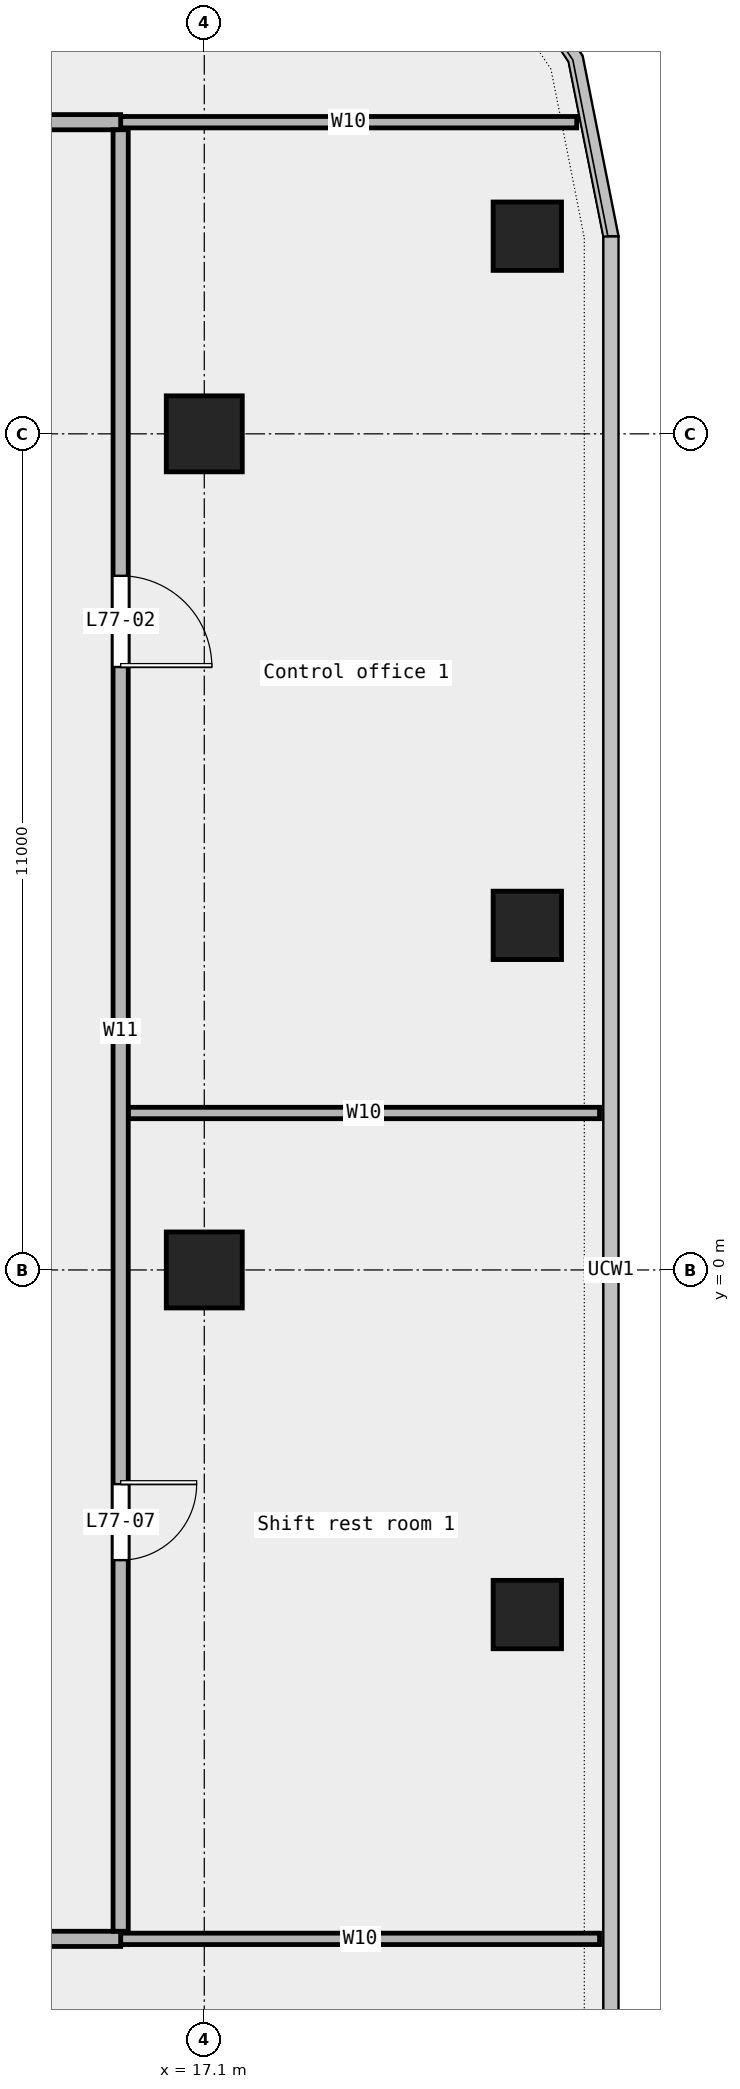
"""IFC4 building model, lengths in metres.
Left out: names, types, materials, properties, quantities, classifications, styles, units other than length and angle.
Written with IfcOpenShell. Run it as: python <this file> out.ifc"""

import sys

from ifc_helpers import new_model, si_unit, direction, frame, frame_2d, origin, origin_2d, place, context, subcontext, project, spatial, rectangle, extrude, element, fill, save


model = new_model("IFC4")
c1 = context("Model", 3, precision=1e-05, world=origin(), true_north=direction((0.0, 1.0)))
c2 = subcontext(c1, "Body", "Model", "MODEL_VIEW")
j1 = project(units=[si_unit("LENGTHUNIT", "METRE"), si_unit("PLANEANGLEUNIT", "RADIAN")], contexts=[c1])
p1 = place(None, origin())
s1 = spatial("IfcSite", under=j1, at=p1, CompositionType="ELEMENT")
p2 = place(p1, origin())
s2 = spatial("IfcBuilding", under=s1, at=p2, CompositionType="ELEMENT")
p3 = place(p2, frame((0.0, 0.0, 353.4)))
s3 = spatial("IfcBuildingStorey", under=s2, at=p3, CompositionType="ELEMENT", Elevation=353.4)
for number, where, z_axis, x_axis in (
    (1, (21.35, -4.533, 0.0), (0.0, 0.0, 1.0), (1.0, 0.0, 0.0)),
    (2, (21.35, 4.533, 0.0), (0.0, 0.0, 1.0), (1.0, 0.0, 0.0)),
    (3, (21.35, 13.6, 0.0), (0.0, 0.0, 1.0), (1.0, 0.0, 0.0)),
):
    element("IfcColumn", number, at=place(p3, frame(where, z_axis=z_axis, x_axis=x_axis)), inside=s3, PredefinedType="COLUMN", context=c2, shape_type="SweptSolid", body=[
        extrude(rectangle(XDim=0.9, YDim=0.9, at=origin_2d()), origin(), (0.0, 0.0, 1.0), 3.6),
    ])
for number, where, z_axis, x_axis in (
    (4, (17.1, 0.0, 0.0), (0.0, 0.0, 1.0), (1.0, 0.0, 0.0)),
    (5, (17.1, 11.0, 0.0), (0.0, 0.0, 1.0), (1.0, 0.0, 0.0)),
):
    element("IfcColumn", number, at=place(p3, frame(where, z_axis=z_axis, x_axis=x_axis)), inside=s3, PredefinedType="COLUMN", context=c2, shape_type="SweptSolid", body=[
        extrude(rectangle(XDim=1.0, YDim=1.0, at=origin_2d()), origin(), (0.0, 0.0, 1.0), 3.6),
    ])
p4 = place(p3, frame((16.0, -8.8, 0.0), z_axis=(0.0, 0.0, 1.0), x_axis=(1.0, 0.0, 0.0)))
e6 = element("IfcWall", 6, at=p4, inside=s3, PredefinedType="PARTITIONING", context=c2, shape_type="SweptSolid", body=[
    extrude(rectangle(XDim=6.3, YDim=0.15, at=frame_2d((3.15, 0.0))), origin(), (0.0, 0.0, 1.0), 3.6),
])
p5 = place(p3, frame((-16.0, -8.8, 0.0), z_axis=(0.0, 0.0, 1.0), x_axis=(1.0, 0.0, 0.0)))
e7 = element("IfcWall", 7, at=p5, inside=s3, PredefinedType="PARTITIONING", context=c2, shape_type="SweptSolid", body=[
    extrude(rectangle(XDim=32.0, YDim=0.2, at=frame_2d((16.0, 0.0))), origin(), (0.0, 0.0, 1.0), 3.6),
])
p6 = place(p5, frame((25.31, 0.0, 0.0)))
e8 = element("IfcOpeningElement", 8, at=p6, cuts=e7, PredefinedType="OPENING", context=c2, shape_type="SweptSolid", body=[
    extrude(rectangle(XDim=1.8, YDim=2.1, at=frame_2d((0.9, 1.05))), frame((0.0, 0.112, 0.0), z_axis=(0.0, -1.0, 0.0), x_axis=(1.0, 0.0, 0.0)), (0.0, 0.0, 1.0), 0.224),
])
p7 = place(p5, frame((7.81, 0.0, 0.0)))
e9 = element("IfcOpeningElement", 9, at=p7, cuts=e7, PredefinedType="OPENING", context=c2, shape_type="SweptSolid", body=[
    extrude(rectangle(XDim=1.8, YDim=2.1, at=frame_2d((0.9, 1.05))), frame((0.0, 0.112, 0.0), z_axis=(0.0, -1.0, 0.0), x_axis=(1.0, 0.0, 0.0)), (0.0, 0.0, 1.0), 0.224),
])
p8 = place(p3, frame((16.1, 2.065, 0.0), z_axis=(0.0, 0.0, 1.0), x_axis=(1.0, 0.0, 0.0)))
e10 = element("IfcWall", 10, at=p8, inside=s3, PredefinedType="PARTITIONING", context=c2, shape_type="SweptSolid", body=[
    extrude(rectangle(XDim=6.2, YDim=0.15, at=frame_2d((3.1, 0.0))), origin(), (0.0, 0.0, 1.0), 3.6),
])
p9 = place(p3, frame((16.0, 15.1, 0.0), z_axis=(0.0, 0.0, 1.0), x_axis=(1.0, 0.0, 0.0)))
e11 = element("IfcWall", 11, at=p9, inside=s3, PredefinedType="PARTITIONING", context=c2, shape_type="SweptSolid", body=[
    extrude(rectangle(XDim=6.0, YDim=0.15, at=frame_2d((3.0, 0.0))), origin(), (0.0, 0.0, 1.0), 3.6),
])
p10 = place(p3, frame((-16.0, 15.1, 0.0), z_axis=(0.0, 0.0, 1.0), x_axis=(1.0, 0.0, 0.0)))
e12 = element("IfcWall", 12, at=p10, inside=s3, PredefinedType="PARTITIONING", context=c2, shape_type="SweptSolid", body=[
    extrude(rectangle(XDim=32.0, YDim=0.2, at=frame_2d((16.0, 0.0))), origin(), (0.0, 0.0, 1.0), 3.6),
])
p11 = place(p10, frame((5.823, 0.0, 0.0)))
e13 = element("IfcOpeningElement", 13, at=p11, cuts=e12, PredefinedType="OPENING", context=c2, shape_type="SweptSolid", body=[
    extrude(rectangle(XDim=1.2, YDim=2.1, at=frame_2d((0.6, 1.05))), frame((0.0, 0.112, 0.0), z_axis=(0.0, -1.0, 0.0), x_axis=(1.0, 0.0, 0.0)), (0.0, 0.0, 1.0), 0.224),
])
p12 = place(p10, frame((18.558, 0.0, 0.0)))
e14 = element("IfcOpeningElement", 14, at=p12, cuts=e12, PredefinedType="OPENING", context=c2, shape_type="SweptSolid", body=[
    extrude(rectangle(XDim=1.2, YDim=2.1, at=frame_2d((0.6, 1.05))), frame((0.0, 0.112, 0.0), z_axis=(0.0, -1.0, 0.0), x_axis=(1.0, 0.0, 0.0)), (0.0, 0.0, 1.0), 0.224),
])
p13 = place(p10, frame((28.135, 0.0, 0.0)))
e15 = element("IfcOpeningElement", 15, at=p13, cuts=e12, PredefinedType="OPENING", context=c2, shape_type="SweptSolid", body=[
    extrude(rectangle(XDim=1.2, YDim=2.1, at=frame_2d((0.6, 1.05))), frame((0.0, 0.112, 0.0), z_axis=(0.0, -1.0, 0.0), x_axis=(1.0, 0.0, 0.0)), (0.0, 0.0, 1.0), 0.224),
])
p14 = place(p3, frame((16.0, -8.7, 0.0), z_axis=(0.0, 0.0, 1.0), x_axis=(0.0, 1.0, 0.0)))
e16 = element("IfcWall", 16, at=p14, inside=s3, PredefinedType="PARTITIONING", context=c2, shape_type="SweptSolid", body=[
    extrude(rectangle(XDim=23.7, YDim=0.2, at=frame_2d((11.85, 0.0))), origin(), (0.0, 0.0, 1.0), 3.6),
])
p15 = place(p14, frame((16.633, 0.0, 0.0)))
e17 = element("IfcOpeningElement", 17, at=p15, cuts=e16, PredefinedType="OPENING", context=c2, shape_type="SweptSolid", body=[
    extrude(rectangle(XDim=1.2, YDim=2.1, at=frame_2d((0.6, 1.05))), frame((0.0, 0.112, 0.0), z_axis=(0.0, -1.0, 0.0), x_axis=(1.0, 0.0, 0.0)), (0.0, 0.0, 1.0), 0.224),
])
p16 = place(p14, frame((4.883, 0.0, 0.0)))
e18 = element("IfcOpeningElement", 18, at=p16, cuts=e16, PredefinedType="OPENING", context=c2, shape_type="SweptSolid", body=[
    extrude(rectangle(XDim=1.0, YDim=2.1, at=frame_2d((0.5, 1.05))), frame((0.0, 0.112, 0.0), z_axis=(0.0, -1.0, 0.0), x_axis=(1.0, 0.0, 0.0)), (0.0, 0.0, 1.0), 0.224),
])
p17 = place(p15, origin())
e19 = element("IfcDoor", 19, at=p17, inside=s3, OperationType="SINGLE_SWING_RIGHT", PredefinedType="DOOR", context=c2, shape_type="SweptSolid", body=[
    extrude(rectangle(XDim=1.2, YDim=2.1, at=frame_2d((0.6, 1.05))), frame((0.0, 0.025, 0.0), z_axis=(0.0, -1.0, 0.0), x_axis=(1.0, 0.0, 0.0)), (0.0, 0.0, 1.0), 0.05),
])
fill(e17, e19)
p18 = place(p16, origin())
e20 = element("IfcDoor", 20, at=p18, inside=s3, OperationType="SINGLE_SWING_LEFT", PredefinedType="DOOR", context=c2, shape_type="SweptSolid", body=[
    extrude(rectangle(XDim=1.0, YDim=2.1, at=frame_2d((0.5, 1.05))), frame((0.0, 0.025, 0.0), z_axis=(0.0, -1.0, 0.0), x_axis=(1.0, 0.0, 0.0)), (0.0, 0.0, 1.0), 0.05),
])
fill(e18, e20)
save(model, sys.argv[1])
